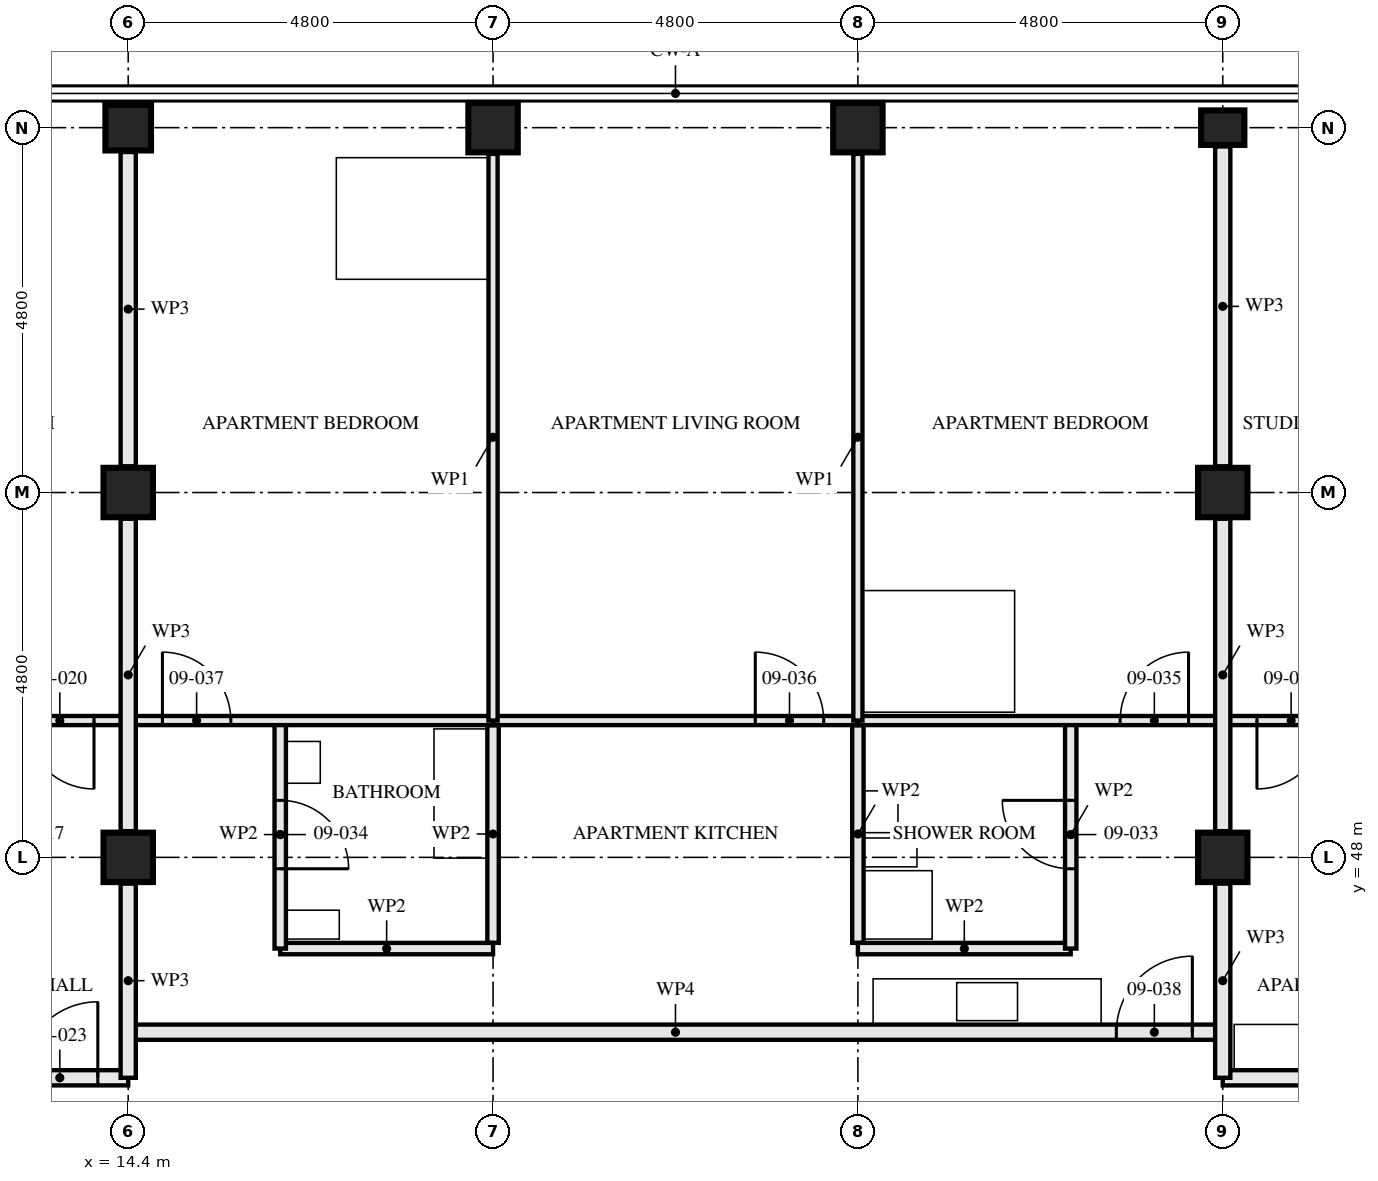
"""IFC4 building model, lengths in metres.
Left out: names, types, materials, properties, quantities, classifications, styles, units other than length and angle.
Written with IfcOpenShell. Run it as: python <this file> out.ifc"""

import sys

from ifc_helpers import new_model, si_unit, direction, frame, frame_2d, origin, origin_2d, place, context, subcontext, project, spatial, rectangle, hollow_rectangle, i_section, extrude, element, fill, save


model = new_model("IFC4")
c1 = context("Model", 3, precision=1e-05, world=origin(), true_north=direction((0.0, 1.0)))
c2 = subcontext(c1, "Body", "Model", "MODEL_VIEW")
j1 = project(units=[si_unit("LENGTHUNIT", "METRE"), si_unit("PLANEANGLEUNIT", "RADIAN")], contexts=[c1])
p1 = place(None, origin())
s1 = spatial("IfcSite", under=j1, at=p1, CompositionType="ELEMENT")
p2 = place(p1, origin())
s2 = spatial("IfcBuilding", under=s1, at=p2, CompositionType="ELEMENT")
p3 = place(p2, frame((0.0, 0.0, 37.5)))
s3 = spatial("IfcBuildingStorey", under=s2, at=p3, CompositionType="ELEMENT", Elevation=37.5)
for number, where, z_axis, x_axis in (
    (1, (14.4, 48.0, 0.0), (0.0, 0.0, 1.0), (1.0, 0.0, 0.0)),
    (2, (14.4, 52.8, 0.0), (0.0, 0.0, 1.0), (1.0, 0.0, 0.0)),
):
    element("IfcColumn", number, at=place(p3, frame(where, z_axis=z_axis, x_axis=x_axis)), inside=s3, PredefinedType="COLUMN", context=c2, shape_type="SweptSolid", body=[
        extrude(hollow_rectangle(XDim=0.65, YDim=0.65, WallThickness=0.05, at=origin_2d()), origin(), (0.0, 0.0, 1.0), 3.5),
    ])
p4 = place(p3, frame((14.4, 57.6, 0.0), z_axis=(0.0, 0.0, 1.0), x_axis=(0.0, 1.0, 0.0)))
e3 = element("IfcColumn", 3, at=p4, inside=s3, PredefinedType="COLUMN", context=c2, shape_type="SweptSolid", body=[
    extrude(hollow_rectangle(XDim=0.6, YDim=0.6, WallThickness=0.08, at=origin_2d()), origin(), (0.0, 0.0, 1.0), 3.5),
])
for number, where, z_axis, x_axis in (
    (4, (19.2, 57.6, 0.0), (0.0, 0.0, 1.0), (0.0, 1.0, 0.0)),
    (5, (24.0, 57.6, 0.0), (0.0, 0.0, 1.0), (0.0, 1.0, 0.0)),
):
    element("IfcColumn", number, at=place(p3, frame(where, z_axis=z_axis, x_axis=x_axis)), inside=s3, PredefinedType="COLUMN", context=c2, shape_type="SweptSolid", body=[
        extrude(hollow_rectangle(XDim=0.65, YDim=0.65, WallThickness=0.08, at=origin_2d()), origin(), (0.0, 0.0, 1.0), 3.5),
    ])
for number, where, z_axis, x_axis in (
    (6, (28.8, 48.0, 0.0), (0.0, 0.0, 1.0), (1.0, 0.0, 0.0)),
    (7, (28.8, 52.8, 0.0), (0.0, 0.0, 1.0), (1.0, 0.0, 0.0)),
):
    element("IfcColumn", number, at=place(p3, frame(where, z_axis=z_axis, x_axis=x_axis)), inside=s3, PredefinedType="COLUMN", context=c2, shape_type="SweptSolid", body=[
        extrude(hollow_rectangle(XDim=0.65, YDim=0.65, WallThickness=0.05, at=origin_2d()), origin(), (0.0, 0.0, 1.0), 3.5),
    ])
p5 = place(p3, frame((28.8, 57.6, 0.0), z_axis=(0.0, 0.0, 1.0), x_axis=(0.0, 1.0, 0.0)))
e8 = element("IfcColumn", 8, at=p5, inside=s3, PredefinedType="COLUMN", context=c2, shape_type="SweptSolid", body=[
    extrude(i_section(OverallWidth=0.454, OverallDepth=0.569, WebThickness=0.078, FlangeThickness=0.125, FilletRadius=0.015, at=origin_2d()), origin(), (0.0, 0.0, 1.0), 3.5),
])
p6 = place(p3, frame((14.4, 49.8, 0.0), z_axis=(0.0, 0.0, 1.0), x_axis=(-1.0, 0.0, 0.0)))
e9 = element("IfcWall", 9, at=p6, inside=s3, PredefinedType="PARTITIONING", context=c2, shape_type="SweptSolid", body=[
    extrude(rectangle(XDim=4.8, YDim=0.12, at=frame_2d((2.4, 0.0))), origin(), (0.0, 0.0, 1.0), 3.33),
])
p7 = place(p6, frame((0.45, 0.0, 0.0)))
e10 = element("IfcOpeningElement", 10, at=p7, cuts=e9, PredefinedType="OPENING", context=c2, shape_type="SweptSolid", body=[
    extrude(rectangle(XDim=0.9, YDim=2.1, at=frame_2d((0.45, 1.05))), frame((0.0, 0.071, 0.0), z_axis=(0.0, -1.0, 0.0), x_axis=(1.0, 0.0, 0.0)), (0.0, 0.0, 1.0), 0.141),
])
p8 = place(p3, frame((14.4, 45.1, 0.0), z_axis=(0.0, 0.0, 1.0), x_axis=(-1.0, 0.0, 0.0)))
e11 = element("IfcWall", 11, at=p8, inside=s3, PredefinedType="PARTITIONING", context=c2, shape_type="SweptSolid", body=[
    extrude(rectangle(XDim=9.6, YDim=0.2, at=frame_2d((4.8, 0.0))), origin(), (0.0, 0.0, 1.0), 3.33),
])
p9 = place(p8, frame((0.4, 0.0, 0.0)))
e12 = element("IfcOpeningElement", 12, at=p9, cuts=e11, PredefinedType="OPENING", context=c2, shape_type="SweptSolid", body=[
    extrude(rectangle(XDim=1.0, YDim=2.1, at=frame_2d((0.5, 1.05))), frame((0.0, 0.111, 0.0), z_axis=(0.0, -1.0, 0.0), x_axis=(1.0, 0.0, 0.0)), (0.0, 0.0, 1.0), 0.221),
])
p10 = place(p3, frame((26.8, 49.8, 0.0), z_axis=(0.0, 0.0, 1.0), x_axis=(0.0, -1.0, 0.0)))
e13 = element("IfcWall", 13, at=p10, inside=s3, PredefinedType="PARTITIONING", context=c2, shape_type="SweptSolid", body=[
    extrude(rectangle(XDim=3.0, YDim=0.15, at=frame_2d((1.5, 0.0))), origin(), (0.0, 0.0, 1.0), 2.55),
])
p11 = place(p10, frame((1.05, 0.0, 0.0)))
e14 = element("IfcOpeningElement", 14, at=p11, cuts=e13, PredefinedType="OPENING", context=c2, shape_type="SweptSolid", body=[
    extrude(rectangle(XDim=0.9, YDim=2.1, at=frame_2d((0.45, 1.05))), frame((0.0, 0.085, 0.0), z_axis=(0.0, -1.0, 0.0), x_axis=(1.0, 0.0, 0.0)), (0.0, 0.0, 1.0), 0.171),
])
p12 = place(p3, frame((26.8, 46.8, 0.0), z_axis=(0.0, 0.0, 1.0), x_axis=(-1.0, 0.0, 0.0)))
e15 = element("IfcWall", 15, at=p12, inside=s3, PredefinedType="PARTITIONING", context=c2, shape_type="SweptSolid", body=[
    extrude(rectangle(XDim=2.8, YDim=0.15, at=frame_2d((1.4, 0.0))), origin(), (0.0, 0.0, 1.0), 3.33),
])
p13 = place(p3, frame((16.4, 49.8, 0.0), z_axis=(0.0, 0.0, 1.0), x_axis=(0.0, -1.0, 0.0)))
e16 = element("IfcWall", 16, at=p13, inside=s3, PredefinedType="PARTITIONING", context=c2, shape_type="SweptSolid", body=[
    extrude(rectangle(XDim=3.0, YDim=0.15, at=frame_2d((1.5, 0.0))), origin(), (0.0, 0.0, 1.0), 2.55),
])
p14 = place(p13, frame((1.05, 0.0, 0.0)))
e17 = element("IfcOpeningElement", 17, at=p14, cuts=e16, PredefinedType="OPENING", context=c2, shape_type="SweptSolid", body=[
    extrude(rectangle(XDim=0.9, YDim=2.1, at=frame_2d((0.45, 1.05))), frame((0.0, 0.085, 0.0), z_axis=(0.0, -1.0, 0.0), x_axis=(1.0, 0.0, 0.0)), (0.0, 0.0, 1.0), 0.171),
])
p15 = place(p3, frame((19.2, 46.8, 0.0), z_axis=(0.0, 0.0, 1.0), x_axis=(-1.0, 0.0, 0.0)))
e18 = element("IfcWall", 18, at=p15, inside=s3, PredefinedType="PARTITIONING", context=c2, shape_type="SweptSolid", body=[
    extrude(rectangle(XDim=2.8, YDim=0.15, at=frame_2d((1.4, 0.0))), origin(), (0.0, 0.0, 1.0), 3.33),
])
p16 = place(p3, frame((28.8, 49.8, 0.0), z_axis=(0.0, 0.0, 1.0), x_axis=(-1.0, 0.0, 0.0)))
e19 = element("IfcWall", 19, at=p16, inside=s3, PredefinedType="PARTITIONING", context=c2, shape_type="SweptSolid", body=[
    extrude(rectangle(XDim=4.8, YDim=0.12, at=frame_2d((2.4, 0.0))), origin(), (0.0, 0.0, 1.0), 3.33),
])
p17 = place(p16, frame((0.45, 0.0, 0.0)))
e20 = element("IfcOpeningElement", 20, at=p17, cuts=e19, PredefinedType="OPENING", context=c2, shape_type="SweptSolid", body=[
    extrude(rectangle(XDim=0.9, YDim=2.1, at=frame_2d((0.45, 1.05))), frame((0.0, 0.071, 0.0), z_axis=(0.0, -1.0, 0.0), x_axis=(1.0, 0.0, 0.0)), (0.0, 0.0, 1.0), 0.141),
])
p18 = place(p3, frame((24.0, 49.8, 0.0), z_axis=(0.0, 0.0, 1.0), x_axis=(-1.0, 0.0, 0.0)))
e21 = element("IfcWall", 21, at=p18, inside=s3, PredefinedType="PARTITIONING", context=c2, shape_type="SweptSolid", body=[
    extrude(rectangle(XDim=4.8, YDim=0.12, at=frame_2d((2.4, 0.0))), origin(), (0.0, 0.0, 1.0), 3.33),
])
p19 = place(p18, frame((0.45, 0.0, 0.0)))
e22 = element("IfcOpeningElement", 22, at=p19, cuts=e21, PredefinedType="OPENING", context=c2, shape_type="SweptSolid", body=[
    extrude(rectangle(XDim=0.9, YDim=2.1, at=frame_2d((0.45, 1.05))), frame((0.0, 0.071, 0.0), z_axis=(0.0, -1.0, 0.0), x_axis=(1.0, 0.0, 0.0)), (0.0, 0.0, 1.0), 0.141),
])
p20 = place(p3, frame((19.2, 49.8, 0.0), z_axis=(0.0, 0.0, 1.0), x_axis=(-1.0, 0.0, 0.0)))
e23 = element("IfcWall", 23, at=p20, inside=s3, PredefinedType="PARTITIONING", context=c2, shape_type="SweptSolid", body=[
    extrude(rectangle(XDim=4.8, YDim=0.12, at=frame_2d((2.4, 0.0))), origin(), (0.0, 0.0, 1.0), 3.33),
])
p21 = place(p20, frame((3.45, 0.0, 0.0)))
e24 = element("IfcOpeningElement", 24, at=p21, cuts=e23, PredefinedType="OPENING", context=c2, shape_type="SweptSolid", body=[
    extrude(rectangle(XDim=0.9, YDim=2.1, at=frame_2d((0.45, 1.05))), frame((0.0, 0.071, 0.0), z_axis=(0.0, -1.0, 0.0), x_axis=(1.0, 0.0, 0.0)), (0.0, 0.0, 1.0), 0.141),
])
for number, where, z_axis, x_axis in (
    (25, (24.0, 57.255, 0.0), (0.0, 0.0, 1.0), (0.0, -1.0, 0.0)),
    (26, (19.2, 57.255, 0.0), (0.0, 0.0, 1.0), (0.0, -1.0, 0.0)),
):
    element("IfcWall", number, at=place(p3, frame(where, z_axis=z_axis, x_axis=x_axis)), inside=s3, PredefinedType="PARTITIONING", context=c2, shape_type="SweptSolid", body=[
        extrude(rectangle(XDim=7.455, YDim=0.12, at=frame_2d((3.728, 0.0))), origin(), (0.0, 0.0, 1.0), 2.55),
    ])
p22 = place(p3, frame((28.8, 45.7, 0.0), z_axis=(0.0, 0.0, 1.0), x_axis=(-1.0, 0.0, 0.0)))
e27 = element("IfcWall", 27, at=p22, inside=s3, PredefinedType="PARTITIONING", context=c2, shape_type="SweptSolid", body=[
    extrude(rectangle(XDim=14.4, YDim=0.2, at=frame_2d((7.2, 0.0))), origin(), (0.0, 0.0, 1.0), 3.33),
])
p23 = place(p22, frame((0.4, 0.0, 0.0)))
e28 = element("IfcOpeningElement", 28, at=p23, cuts=e27, PredefinedType="OPENING", context=c2, shape_type="SweptSolid", body=[
    extrude(rectangle(XDim=1.0, YDim=2.1, at=frame_2d((0.5, 1.05))), frame((0.0, 0.111, 0.0), z_axis=(0.0, -1.0, 0.0), x_axis=(1.0, 0.0, 0.0)), (0.0, 0.0, 1.0), 0.221),
])
p24 = place(p3, frame((33.6, 49.8, 0.0), z_axis=(0.0, 0.0, 1.0), x_axis=(-1.0, 0.0, 0.0)))
e29 = element("IfcWall", 29, at=p24, inside=s3, PredefinedType="PARTITIONING", context=c2, shape_type="SweptSolid", body=[
    extrude(rectangle(XDim=4.8, YDim=0.12, at=frame_2d((2.4, 0.0))), origin(), (0.0, 0.0, 1.0), 3.33),
])
p25 = place(p24, frame((3.45, 0.0, 0.0)))
e30 = element("IfcOpeningElement", 30, at=p25, cuts=e29, PredefinedType="OPENING", context=c2, shape_type="SweptSolid", body=[
    extrude(rectangle(XDim=0.9, YDim=2.1, at=frame_2d((0.45, 1.05))), frame((0.0, 0.071, 0.0), z_axis=(0.0, -1.0, 0.0), x_axis=(1.0, 0.0, 0.0)), (0.0, 0.0, 1.0), 0.141),
])
p26 = place(p3, frame((38.4, 45.1, 0.0), z_axis=(0.0, 0.0, 1.0), x_axis=(-1.0, 0.0, 0.0)))
e31 = element("IfcWall", 31, at=p26, inside=s3, PredefinedType="PARTITIONING", context=c2, shape_type="SweptSolid", body=[
    extrude(rectangle(XDim=9.6, YDim=0.2, at=frame_2d((4.8, 0.0))), origin(), (0.0, 0.0, 1.0), 3.33),
])
p27 = place(p26, frame((0.4, 0.0, 0.0)))
e32 = element("IfcOpeningElement", 32, at=p27, cuts=e31, PredefinedType="OPENING", context=c2, shape_type="SweptSolid", body=[
    extrude(rectangle(XDim=1.0, YDim=2.1, at=frame_2d((0.5, 1.05))), frame((0.0, 0.111, 0.0), z_axis=(0.0, -1.0, 0.0), x_axis=(1.0, 0.0, 0.0)), (0.0, 0.0, 1.0), 0.221),
])
p28 = place(p26, frame((5.2, 0.0, 0.0)))
e33 = element("IfcOpeningElement", 33, at=p28, cuts=e31, PredefinedType="OPENING", context=c2, shape_type="SweptSolid", body=[
    extrude(rectangle(XDim=1.0, YDim=2.1, at=frame_2d((0.5, 1.05))), frame((0.0, 0.111, 0.0), z_axis=(0.0, -1.0, 0.0), x_axis=(1.0, 0.0, 0.0)), (0.0, 0.0, 1.0), 0.221),
])
p29 = place(p3, frame((14.4, 45.1, 0.0), z_axis=(0.0, 0.0, 1.0), x_axis=(0.0, 1.0, 0.0)))
e34 = element("IfcWall", 34, at=p29, inside=s3, PredefinedType="PARTITIONING", context=c2, shape_type="SweptSolid", body=[
    extrude(rectangle(XDim=2.555, YDim=0.2, at=frame_2d((1.277, 0.0))), origin(), (0.0, 0.0, 1.0), 2.32),
])
p30 = place(p3, frame((14.4, 48.345, 0.0), z_axis=(0.0, 0.0, 1.0), x_axis=(0.0, 1.0, 0.0)))
e35 = element("IfcWall", 35, at=p30, inside=s3, PredefinedType="PARTITIONING", context=c2, shape_type="SweptSolid", body=[
    extrude(rectangle(XDim=4.11, YDim=0.2, at=frame_2d((2.055, 0.0))), origin(), (0.0, 0.0, 1.0), 2.32),
])
p31 = place(p3, frame((14.4, 53.145, 0.0), z_axis=(0.0, 0.0, 1.0), x_axis=(0.0, 1.0, 0.0)))
e36 = element("IfcWall", 36, at=p31, inside=s3, PredefinedType="PARTITIONING", context=c2, shape_type="SweptSolid", body=[
    extrude(rectangle(XDim=4.135, YDim=0.2, at=frame_2d((2.067, 0.0))), origin(), (0.0, 0.0, 1.0), 2.32),
])
p32 = place(p3, frame((28.8, 45.1, 0.0), z_axis=(0.0, 0.0, 1.0), x_axis=(0.0, 1.0, 0.0)))
e37 = element("IfcWall", 37, at=p32, inside=s3, PredefinedType="PARTITIONING", context=c2, shape_type="SweptSolid", body=[
    extrude(rectangle(XDim=2.555, YDim=0.2, at=frame_2d((1.277, 0.0))), origin(), (0.0, 0.0, 1.0), 2.32),
])
p33 = place(p3, frame((28.8, 48.345, 0.0), z_axis=(0.0, 0.0, 1.0), x_axis=(0.0, 1.0, 0.0)))
e38 = element("IfcWall", 38, at=p33, inside=s3, PredefinedType="PARTITIONING", context=c2, shape_type="SweptSolid", body=[
    extrude(rectangle(XDim=4.11, YDim=0.2, at=frame_2d((2.055, 0.0))), origin(), (0.0, 0.0, 1.0), 2.32),
])
p34 = place(p3, frame((28.8, 53.145, 0.0), z_axis=(0.0, 0.0, 1.0), x_axis=(0.0, 1.0, 0.0)))
e39 = element("IfcWall", 39, at=p34, inside=s3, PredefinedType="PARTITIONING", context=c2, shape_type="SweptSolid", body=[
    extrude(rectangle(XDim=4.208, YDim=0.2, at=frame_2d((2.104, 0.0))), origin(), (0.0, 0.0, 1.0), 2.32),
])
for number, where, z_axis, x_axis in (
    (40, (24.0, 46.875, 0.0), (0.0, 0.0, 1.0), (0.0, 1.0, 0.0)),
    (41, (19.2, 49.74, 0.0), (0.0, 0.0, 1.0), (0.0, -1.0, 0.0)),
):
    element("IfcWall", number, at=place(p3, frame(where, z_axis=z_axis, x_axis=x_axis)), inside=s3, PredefinedType="PARTITIONING", context=c2, shape_type="SweptSolid", body=[
        extrude(rectangle(XDim=2.865, YDim=0.15, at=frame_2d((1.433, 0.0))), origin(), (0.0, 0.0, 1.0), 2.55),
    ])
p35 = place(p7, origin())
e42 = element("IfcDoor", 42, at=p35, inside=s3, OperationType="SINGLE_SWING_RIGHT", PredefinedType="DOOR", context=c2, shape_type="SweptSolid", body=[
    extrude(rectangle(XDim=0.9, YDim=2.1, at=frame_2d((0.45, 1.05))), frame((0.0, 0.022, 0.0), z_axis=(0.0, -1.0, 0.0), x_axis=(1.0, 0.0, 0.0)), (0.0, 0.0, 1.0), 0.044),
])
fill(e10, e42)
p36 = place(p9, frame((1.0, 0.0, 0.0), z_axis=(0.0, 0.0, 1.0), x_axis=(-1.0, 0.0, 0.0)))
e43 = element("IfcDoor", 43, at=p36, inside=s3, OperationType="SINGLE_SWING_LEFT", PredefinedType="DOOR", context=c2, shape_type="SweptSolid", body=[
    extrude(rectangle(XDim=1.0, YDim=2.1, at=frame_2d((0.5, 1.05))), frame((0.0, 0.027, 0.0), z_axis=(0.0, -1.0, 0.0), x_axis=(1.0, 0.0, 0.0)), (0.0, 0.0, 1.0), 0.054),
])
fill(e12, e43)
p37 = place(p11, frame((0.9, 0.0, 0.0), z_axis=(0.0, 0.0, 1.0), x_axis=(-1.0, 0.0, 0.0)))
e44 = element("IfcDoor", 44, at=p37, inside=s3, OperationType="SINGLE_SWING_LEFT", PredefinedType="DOOR", context=c2, shape_type="SweptSolid", body=[
    extrude(rectangle(XDim=0.9, YDim=2.1, at=frame_2d((0.45, 1.05))), frame((0.0, 0.022, 0.0), z_axis=(0.0, -1.0, 0.0), x_axis=(1.0, 0.0, 0.0)), (0.0, 0.0, 1.0), 0.044),
])
fill(e14, e44)
p38 = place(p14, origin())
e45 = element("IfcDoor", 45, at=p38, inside=s3, OperationType="SINGLE_SWING_LEFT", PredefinedType="DOOR", context=c2, shape_type="SweptSolid", body=[
    extrude(rectangle(XDim=0.9, YDim=2.1, at=frame_2d((0.45, 1.05))), frame((0.0, 0.022, 0.0), z_axis=(0.0, -1.0, 0.0), x_axis=(1.0, 0.0, 0.0)), (0.0, 0.0, 1.0), 0.044),
])
fill(e17, e45)
p39 = place(p17, frame((0.9, 0.0, 0.0), z_axis=(0.0, 0.0, 1.0), x_axis=(-1.0, 0.0, 0.0)))
e46 = element("IfcDoor", 46, at=p39, inside=s3, OperationType="SINGLE_SWING_LEFT", PredefinedType="DOOR", context=c2, shape_type="SweptSolid", body=[
    extrude(rectangle(XDim=0.9, YDim=2.1, at=frame_2d((0.45, 1.05))), frame((0.0, 0.022, 0.0), z_axis=(0.0, -1.0, 0.0), x_axis=(1.0, 0.0, 0.0)), (0.0, 0.0, 1.0), 0.044),
])
fill(e20, e46)
p40 = place(p19, frame((0.9, 0.0, 0.0), z_axis=(0.0, 0.0, 1.0), x_axis=(-1.0, 0.0, 0.0)))
e47 = element("IfcDoor", 47, at=p40, inside=s3, OperationType="SINGLE_SWING_RIGHT", PredefinedType="DOOR", context=c2, shape_type="SweptSolid", body=[
    extrude(rectangle(XDim=0.9, YDim=2.1, at=frame_2d((0.45, 1.05))), frame((0.0, 0.022, 0.0), z_axis=(0.0, -1.0, 0.0), x_axis=(1.0, 0.0, 0.0)), (0.0, 0.0, 1.0), 0.044),
])
fill(e22, e47)
p41 = place(p21, frame((0.9, 0.0, 0.0), z_axis=(0.0, 0.0, 1.0), x_axis=(-1.0, 0.0, 0.0)))
e48 = element("IfcDoor", 48, at=p41, inside=s3, OperationType="SINGLE_SWING_RIGHT", PredefinedType="DOOR", context=c2, shape_type="SweptSolid", body=[
    extrude(rectangle(XDim=0.9, YDim=2.1, at=frame_2d((0.45, 1.05))), frame((0.0, 0.022, 0.0), z_axis=(0.0, -1.0, 0.0), x_axis=(1.0, 0.0, 0.0)), (0.0, 0.0, 1.0), 0.044),
])
fill(e24, e48)
p42 = place(p23, frame((1.0, 0.0, 0.0), z_axis=(0.0, 0.0, 1.0), x_axis=(-1.0, 0.0, 0.0)))
e49 = element("IfcDoor", 49, at=p42, inside=s3, OperationType="SINGLE_SWING_LEFT", PredefinedType="DOOR", context=c2, shape_type="SweptSolid", body=[
    extrude(rectangle(XDim=1.0, YDim=2.1, at=frame_2d((0.5, 1.05))), frame((0.0, 0.027, 0.0), z_axis=(0.0, -1.0, 0.0), x_axis=(1.0, 0.0, 0.0)), (0.0, 0.0, 1.0), 0.054),
])
fill(e28, e49)
p43 = place(p25, origin())
e50 = element("IfcDoor", 50, at=p43, inside=s3, OperationType="SINGLE_SWING_LEFT", PredefinedType="DOOR", context=c2, shape_type="SweptSolid", body=[
    extrude(rectangle(XDim=0.9, YDim=2.1, at=frame_2d((0.45, 1.05))), frame((0.0, 0.022, 0.0), z_axis=(0.0, -1.0, 0.0), x_axis=(1.0, 0.0, 0.0)), (0.0, 0.0, 1.0), 0.044),
])
fill(e30, e50)
save(model, sys.argv[1])
